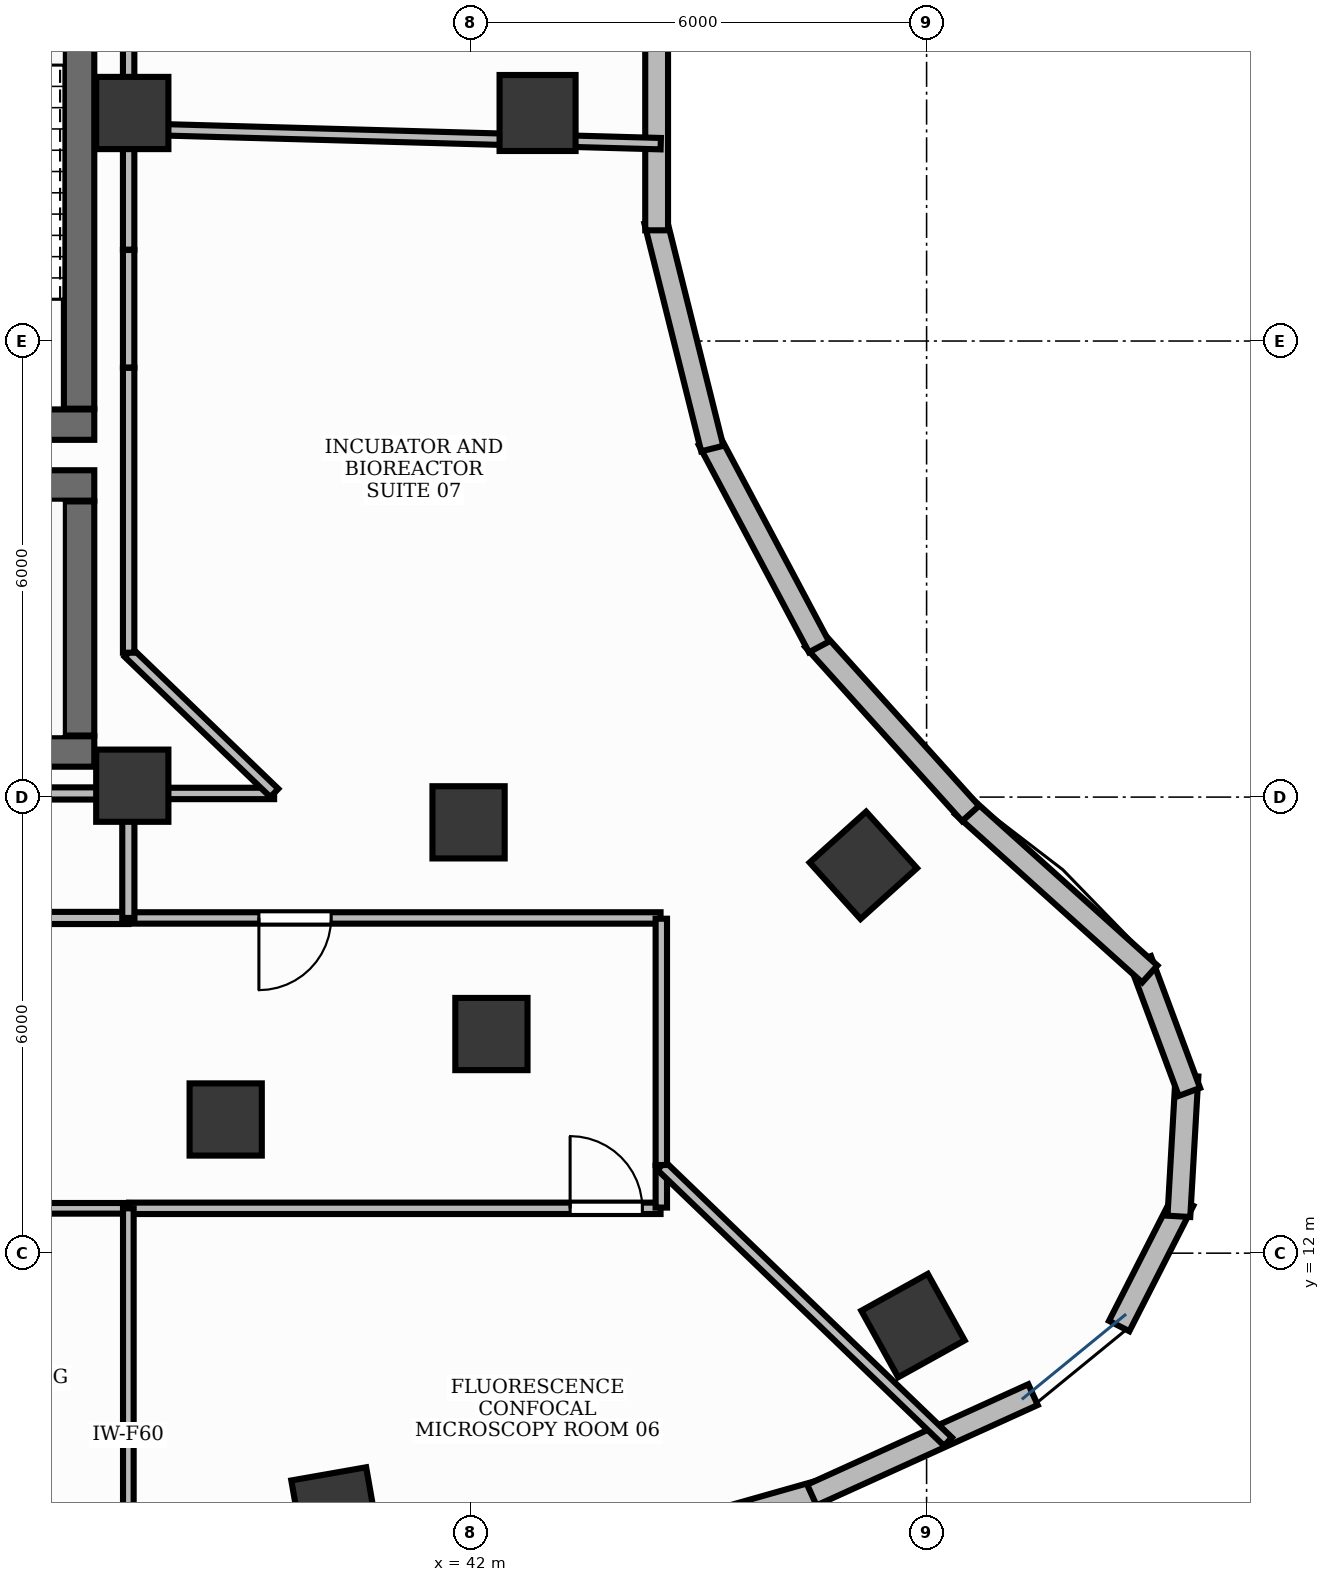
"""IFC4 building model, lengths in metres.
Left out: names, types, materials, properties, quantities, classifications, styles, units other than length and angle.
Written with IfcOpenShell. Run it as: python <this file> out.ifc"""

import sys

from ifc_helpers import new_model, si_unit, direction, frame, frame_2d, origin, origin_2d, place, context, subcontext, project, spatial, rectangle, extrude, element, fill, save


model = new_model("IFC4")
c1 = context("Model", 3, precision=1e-05, world=origin(), true_north=direction((0.0, 1.0)))
c2 = subcontext(c1, "Body", "Model", "MODEL_VIEW")
j1 = project(units=[si_unit("LENGTHUNIT", "METRE"), si_unit("PLANEANGLEUNIT", "RADIAN")], contexts=[c1])
p1 = place(None, origin())
s1 = spatial("IfcSite", under=j1, at=p1, CompositionType="ELEMENT")
p2 = place(p1, origin())
s2 = spatial("IfcBuilding", under=s1, at=p2, CompositionType="ELEMENT")
p3 = place(p2, frame((0.0, 0.0, 154.2)))
s3 = spatial("IfcBuildingStorey", under=s2, at=p3, CompositionType="ELEMENT", Elevation=154.2)
p4 = place(p3, frame((28.852, 18.6, 0.0), z_axis=(0.0, 0.0, 1.0), x_axis=(1.0, 0.0, 0.0)))
e1 = element("IfcWall", 1, at=p4, inside=s3, PredefinedType="SHEAR", context=c2, shape_type="SweptSolid", body=[
    extrude(rectangle(XDim=8.198, YDim=0.4, at=frame_2d((4.099, 0.0))), origin(), (0.0, 0.0, 1.0), 3.9),
])
p5 = place(p3, frame((28.4, 22.1, 0.0), z_axis=(0.0, 0.0, 1.0), x_axis=(1.0, 0.0, 0.0)))
e2 = element("IfcWall", 2, at=p5, inside=s3, PredefinedType="SHEAR", context=c2, shape_type="SweptSolid", body=[
    extrude(rectangle(XDim=8.65, YDim=0.4, at=frame_2d((4.325, 0.0))), origin(), (0.0, 0.0, 1.0), 3.9),
])
p6 = place(p3, frame((36.85, 18.81, 0.0), z_axis=(0.0, 0.0, 1.0), x_axis=(0.0, 1.0, 0.0)))
e3 = element("IfcWall", 3, at=p6, inside=s3, PredefinedType="SHEAR", context=c2, shape_type="SweptSolid", body=[
    extrude(rectangle(XDim=3.08, YDim=0.4, at=frame_2d((1.54, 0.0))), origin(), (0.0, 0.0, 1.0), 3.9),
])
p7 = place(p3, frame((33.15, 22.9, 0.0), z_axis=(0.0, 0.0, 1.0), x_axis=(1.0, 0.0, 0.0)))
e4 = element("IfcWall", 4, at=p7, inside=s3, PredefinedType="SHEAR", context=c2, shape_type="SweptSolid", body=[
    extrude(rectangle(XDim=3.9, YDim=0.4, at=frame_2d((1.95, 0.0))), origin(), (0.0, 0.0, 1.0), 3.9),
])
p8 = place(p3, frame((36.85, 23.11, 0.0), z_axis=(0.0, 0.0, 1.0), x_axis=(0.0, 1.0, 0.0)))
e5 = element("IfcWall", 5, at=p8, inside=s3, PredefinedType="SHEAR", context=c2, shape_type="SweptSolid", body=[
    extrude(rectangle(XDim=7.78, YDim=0.4, at=frame_2d((3.89, 0.0))), origin(), (0.0, 0.0, 1.0), 3.9),
])
for number, where, z_axis, x_axis in (
    (6, (37.55, 18.15, -0.0), (0.0, 0.0, 1.0), (1.0, 0.0, 0.0)),
    (7, (37.55, 27.0, -0.0), (0.0, 0.0, 1.0), (1.0, 0.0, 0.0)),
):
    element("IfcColumn", number, at=place(p3, frame(where, z_axis=z_axis, x_axis=x_axis)), inside=s3, PredefinedType="PILASTER", context=c2, shape_type="SweptSolid", body=[
        extrude(rectangle(XDim=0.95, YDim=0.95, at=origin_2d()), origin(), (0.0, 0.0, 1.0), 3.901),
    ])
p9 = place(p3, frame((40.221, 8.604, -0.0), z_axis=(0.0, 0.0, 1.0), x_axis=(0.984868307662, 0.173304404339, 0.0)))
e8 = element("IfcColumn", 8, at=p9, inside=s3, PredefinedType="COLUMN", context=c2, shape_type="SweptSolid", body=[
    extrude(rectangle(XDim=1.0, YDim=1.0, at=origin_2d()), origin(), (0.0, 0.0, 1.0), 3.901),
])
p10 = place(p3, frame((38.779, 13.759, -0.0), z_axis=(0.0, 0.0, 1.0), x_axis=(1.0, 0.0, 0.0)))
e9 = element("IfcColumn", 9, at=p10, inside=s3, PredefinedType="COLUMN", context=c2, shape_type="SweptSolid", body=[
    extrude(rectangle(XDim=0.95, YDim=0.95, at=origin_2d()), origin(), (0.0, 0.0, 1.0), 3.901),
])
p11 = place(p3, frame((47.821, 11.047, -0.0), z_axis=(0.0, 0.0, 1.0), x_axis=(0.874535078577, 0.484962262797, 0.0)))
e10 = element("IfcColumn", 10, at=p11, inside=s3, PredefinedType="COLUMN", context=c2, shape_type="SweptSolid", body=[
    extrude(rectangle(XDim=1.0, YDim=1.0, at=origin_2d()), origin(), (0.0, 0.0, 1.0), 3.901),
])
p12 = place(p3, frame((42.275, 14.883, -0.0), z_axis=(0.0, 0.0, 1.0), x_axis=(1.0, 0.0, 0.0)))
e11 = element("IfcColumn", 11, at=p12, inside=s3, PredefinedType="COLUMN", context=c2, shape_type="SweptSolid", body=[
    extrude(rectangle(XDim=0.95, YDim=0.95, at=origin_2d()), origin(), (0.0, 0.0, 1.0), 3.901),
])
p13 = place(p3, frame((47.167, 17.102, -0.0), z_axis=(0.0, 0.0, 1.0), x_axis=(-0.669130606359, 0.743144825477, 0.0)))
e12 = element("IfcColumn", 12, at=p13, inside=s3, PredefinedType="COLUMN", context=c2, shape_type="SweptSolid", body=[
    extrude(rectangle(XDim=1.0, YDim=1.0, at=origin_2d()), origin(), (0.0, 0.0, 1.0), 3.901),
])
p14 = place(p3, frame((41.974, 17.668, -0.0), z_axis=(0.0, 0.0, 1.0), x_axis=(1.0, 0.0, 0.0)))
e13 = element("IfcColumn", 13, at=p14, inside=s3, PredefinedType="COLUMN", context=c2, shape_type="SweptSolid", body=[
    extrude(rectangle(XDim=0.95, YDim=0.95, at=origin_2d()), origin(), (0.0, 0.0, 1.0), 3.901),
])
p15 = place(p3, frame((42.882, 27.0, -0.0), z_axis=(0.0, 0.0, 1.0), x_axis=(0.0, 1.0, 0.0)))
e14 = element("IfcColumn", 14, at=p15, inside=s3, PredefinedType="COLUMN", context=c2, shape_type="SweptSolid", body=[
    extrude(rectangle(XDim=1.0, YDim=1.0, at=origin_2d()), origin(), (0.0, 0.0, 1.0), 3.901),
])
p16 = place(p3, frame((40.493, 7.134, 0.0), z_axis=(0.0, 0.0, 1.0), x_axis=(0.962163849422, 0.272471515694, 0.0)))
e15 = element("IfcWall", 15, at=p16, inside=s3, PredefinedType="STANDARD", context=c2, shape_type="SweptSolid", body=[
    extrude(rectangle(XDim=6.409, YDim=0.3, at=frame_2d((3.205, 0.0))), origin(), (0.0, 0.0, 1.0), 3.9),
])
p17 = place(p3, frame((46.49, 8.818, 0.0), z_axis=(0.0, 0.0, 1.0), x_axis=(0.910633193525, 0.413215666268, 0.0)))
e16 = element("IfcWall", 16, at=p17, inside=s3, PredefinedType="STANDARD", context=c2, shape_type="SweptSolid", body=[
    extrude(rectangle(XDim=3.195, YDim=0.3, at=frame_2d((1.598, 0.0))), origin(), (0.0, 0.0, 1.0), 3.9),
])
for number, where, z_axis, x_axis in (
    (17, (50.534, 11.041, 0.0), (0.0, 0.0, 1.0), (0.454, 0.891, 0.0)),
    (18, (51.319, 12.484, 0.0), (0.0, 0.0, 1.0), (0.057, 0.998, 0.0)),
    (19, (51.458, 14.121, 0.0), (0.0, 0.0, 1.0), (-0.349, 0.937, 0.0)),
):
    element("IfcWall", number, at=place(p3, frame(where, z_axis=z_axis, x_axis=x_axis)), inside=s3, PredefinedType="STANDARD", context=c2, shape_type="SweptSolid", body=[
        extrude(rectangle(XDim=1.852, YDim=0.3, at=frame_2d((0.926, 0.0))), origin(), (0.0, 0.0, 1.0), 3.9),
    ])
p18 = place(p3, frame((50.936, 15.673, 0.0), z_axis=(0.0, 0.0, 1.0), x_axis=(-0.743341827472, 0.668911748687, 0.0)))
e20 = element("IfcWall", 20, at=p18, inside=s3, PredefinedType="STANDARD", context=c2, shape_type="SweptSolid", body=[
    extrude(rectangle(XDim=3.31, YDim=0.3, at=frame_2d((1.655, 0.0))), origin(), (0.0, 0.0, 1.0), 3.9),
])
for number, where, z_axis, x_axis in (
    (21, (48.579, 17.784, 0.0), (0.0, 0.0, 1.0), (-0.669, 0.743, 0.0)),
    (22, (46.584, 19.976, 0.0), (0.0, 0.0, 1.0), (-0.469, 0.883, 0.0)),
    (23, (45.18, 22.585, 0.0), (0.0, 0.0, 1.0), (-0.242, 0.97, 0.0)),
    (24, (44.448, 25.457, 0.0), (0.0, 0.0, 1.0), (0.0, 1.0, 0.0)),
):
    element("IfcWall", number, at=place(p3, frame(where, z_axis=z_axis, x_axis=x_axis)), inside=s3, PredefinedType="STANDARD", context=c2, shape_type="SweptSolid", body=[
        extrude(rectangle(XDim=3.087, YDim=0.3, at=frame_2d((1.543, 0.0))), origin(), (0.0, 0.0, 1.0), 3.9),
    ])
p19 = place(p3, frame((37.498, 16.41, 0.0), z_axis=(0.0, 0.0, 1.0), x_axis=(-1.0, 0.0, 0.0)))
e25 = element("IfcWall", 25, at=p19, inside=s3, PredefinedType="PARTITIONING", context=c2, shape_type="SweptSolid", body=[
    extrude(rectangle(XDim=8.498, YDim=0.16, at=frame_2d((4.249, 0.0))), origin(), (0.0, 0.0, 1.0), 2.91),
])
p20 = place(p19, frame((3.372, 0.0, 0.0)))
e26 = element("IfcOpeningElement", 26, at=p20, cuts=e25, PredefinedType="OPENING", context=c2, shape_type="SweptSolid", body=[
    extrude(rectangle(XDim=0.95, YDim=2.15, at=frame_2d((0.475, 1.075))), frame((0.0, 0.095, 0.0), z_axis=(0.0, -1.0, 0.0), x_axis=(1.0, 0.0, 0.0)), (0.0, 0.0, 1.0), 0.19),
])
p21 = place(p3, frame((32.695, 12.59, 0.0), z_axis=(0.0, 0.0, 1.0), x_axis=(1.0, 0.0, 0.0)))
e27 = element("IfcWall", 27, at=p21, inside=s3, PredefinedType="PARTITIONING", context=c2, shape_type="SweptSolid", body=[
    extrude(rectangle(XDim=4.803, YDim=0.14, at=frame_2d((2.401, 0.0))), origin(), (0.0, 0.0, 1.0), 2.91),
])
p22 = place(p21, frame((0.24, 0.0, 0.0)))
e28 = element("IfcOpeningElement", 28, at=p22, cuts=e27, PredefinedType="OPENING", context=c2, shape_type="SweptSolid", body=[
    extrude(rectangle(XDim=0.95, YDim=2.15, at=frame_2d((0.475, 1.075))), frame((0.0, 0.085, 0.0), z_axis=(0.0, -1.0, 0.0), x_axis=(1.0, 0.0, 0.0)), (0.0, 0.0, 1.0), 0.17),
])
p23 = place(p3, frame((37.508, 12.59, 0.0), z_axis=(0.0, 0.0, 1.0), x_axis=(1.0, 0.0, 0.0)))
e29 = element("IfcWall", 29, at=p23, inside=s3, PredefinedType="PARTITIONING", context=c2, shape_type="SweptSolid", body=[
    extrude(rectangle(XDim=6.992, YDim=0.15, at=frame_2d((3.496, 0.0))), origin(), (0.0, 0.0, 1.0), 2.91),
])
p24 = place(p23, frame((5.802, 0.0, 0.0)))
e30 = element("IfcOpeningElement", 30, at=p24, cuts=e29, PredefinedType="OPENING", context=c2, shape_type="SweptSolid", body=[
    extrude(rectangle(XDim=0.95, YDim=2.15, at=frame_2d((0.475, 1.075))), frame((0.0, 0.09, 0.0), z_axis=(0.0, -1.0, 0.0), x_axis=(1.0, 0.0, 0.0)), (0.0, 0.0, 1.0), 0.18),
])
p25 = place(p3, frame((44.5, 16.41, 0.0), z_axis=(0.0, 0.0, 1.0), x_axis=(-1.0, 0.0, 0.0)))
e31 = element("IfcWall", 31, at=p25, inside=s3, PredefinedType="PARTITIONING", context=c2, shape_type="SweptSolid", body=[
    extrude(rectangle(XDim=6.992, YDim=0.15, at=frame_2d((3.496, 0.0))), origin(), (0.0, 0.0, 1.0), 2.91),
])
p26 = place(p25, frame((4.334, 0.0, 0.0)))
e32 = element("IfcOpeningElement", 32, at=p26, cuts=e31, PredefinedType="OPENING", context=c2, shape_type="SweptSolid", body=[
    extrude(rectangle(XDim=0.95, YDim=2.15, at=frame_2d((0.475, 1.075))), frame((0.0, 0.09, 0.0), z_axis=(0.0, -1.0, 0.0), x_axis=(1.0, 0.0, 0.0)), (0.0, 0.0, 1.0), 0.18),
])
p27 = place(p3, frame((31.717, 18.048, 0.0), z_axis=(0.0, 0.0, 1.0), x_axis=(1.0, 0.0, 0.0)))
e33 = element("IfcWall", 33, at=p27, inside=s3, PredefinedType="PARTITIONING", context=c2, shape_type="SweptSolid", body=[
    extrude(rectangle(XDim=5.781, YDim=0.16, at=frame_2d((2.89, 0.0))), origin(), (0.0, 0.0, 1.0), 2.91),
])
p28 = place(p3, frame((37.498, 18.048, 0.0), z_axis=(0.0, 0.0, 1.0), x_axis=(0.0, -1.0, 0.0)))
e34 = element("IfcWall", 34, at=p28, inside=s3, PredefinedType="PARTITIONING", context=c2, shape_type="SweptSolid", body=[
    extrude(rectangle(XDim=1.638, YDim=0.16, at=frame_2d((0.819, 0.0))), origin(), (0.0, 0.0, 1.0), 2.91),
])
p29 = place(p3, frame((37.498, 12.59, 0.0), z_axis=(0.0, 0.0, 1.0), x_axis=(0.0, -1.0, 0.0)))
e35 = element("IfcWall", 35, at=p29, inside=s3, PredefinedType="PARTITIONING", context=c2, shape_type="SweptSolid", body=[
    extrude(rectangle(XDim=5.963, YDim=0.14, at=frame_2d((2.981, 0.0))), origin(), (0.0, 0.0, 1.0), 2.91),
])
p30 = place(p3, frame((44.51, 12.6, 0.0), z_axis=(0.0, 0.0, 1.0), x_axis=(0.0, 1.0, 0.0)))
e36 = element("IfcWall", 36, at=p30, inside=s3, PredefinedType="PARTITIONING", context=c2, shape_type="SweptSolid", body=[
    extrude(rectangle(XDim=0.55, YDim=0.15, at=frame_2d((0.275, 0.0))), origin(), (0.0, 0.0, 1.0), 2.91),
])
p31 = place(p3, frame((44.51, 13.15, 0.0), z_axis=(0.0, 0.0, 1.0), x_axis=(0.720549773239, -0.69340321912, 0.0)))
e37 = element("IfcWall", 37, at=p31, inside=s3, PredefinedType="PARTITIONING", context=c2, shape_type="SweptSolid", body=[
    extrude(rectangle(XDim=5.234, YDim=0.15, at=frame_2d((2.617, 0.0))), origin(), (0.0, 0.0, 1.0), 2.91),
])
p32 = place(p3, frame((37.502, 26.792, 0.0), z_axis=(0.0, 0.0, 1.0), x_axis=(0.999610026888, -0.027924794459, 0.0)))
e38 = element("IfcWall", 38, at=p32, inside=s3, PredefinedType="PARTITIONING", context=c2, shape_type="SweptSolid", body=[
    extrude(rectangle(XDim=7.003, YDim=0.15, at=frame_2d((3.501, 0.0))), origin(), (0.0, 0.0, 1.0), 2.91),
])
p33 = place(p3, frame((44.51, 13.16, 0.0), z_axis=(0.0, 0.0, 1.0), x_axis=(0.0, 1.0, 0.0)))
e39 = element("IfcWall", 39, at=p33, inside=s3, PredefinedType="PARTITIONING", context=c2, shape_type="SweptSolid", body=[
    extrude(rectangle(XDim=3.24, YDim=0.15, at=frame_2d((1.62, 0.0))), origin(), (0.0, 0.0, 1.0), 2.91),
])
p34 = place(p3, frame((37.508, 18.048, 0.0), z_axis=(0.0, 0.0, 1.0), x_axis=(1.0, 0.0, 0.0)))
e40 = element("IfcWall", 40, at=p34, inside=s3, PredefinedType="PARTITIONING", context=c2, shape_type="SweptSolid", body=[
    extrude(rectangle(XDim=1.908, YDim=0.15, at=frame_2d((0.954, 0.0))), origin(), (0.0, 0.0, 1.0), 2.91),
])
p35 = place(p3, frame((39.419, 18.055, 0.0), z_axis=(0.0, 0.0, 1.0), x_axis=(-0.720561375154, 0.693391162791, 0.0)))
e41 = element("IfcWall", 41, at=p35, inside=s3, PredefinedType="PARTITIONING", context=c2, shape_type="SweptSolid", body=[
    extrude(rectangle(XDim=2.66, YDim=0.15, at=frame_2d((1.33, 0.0))), origin(), (0.0, 0.0, 1.0), 2.91),
])
p36 = place(p3, frame((37.502, 19.899, 0.0), z_axis=(0.0, 0.0, 1.0), x_axis=(0.0, 1.0, 0.0)))
e42 = element("IfcWall", 42, at=p36, inside=s3, PredefinedType="PARTITIONING", context=c2, shape_type="SweptSolid", body=[
    extrude(rectangle(XDim=3.749, YDim=0.15, at=frame_2d((1.874, 0.0))), origin(), (0.0, 0.0, 1.0), 2.91),
])
p37 = place(p3, frame((37.502, 23.652, 0.0), z_axis=(0.0, 0.0, 1.0), x_axis=(0.0, 1.0, 0.0)))
e43 = element("IfcWall", 43, at=p37, inside=s3, PredefinedType="PARTITIONING", context=c2, shape_type="SweptSolid", body=[
    extrude(rectangle(XDim=1.546, YDim=0.15, at=frame_2d((0.773, 0.0))), origin(), (0.0, 0.0, 1.0), 2.91),
])
p38 = place(p3, frame((37.502, 25.202, 0.0), z_axis=(0.0, 0.0, 1.0), x_axis=(0.0, 1.0, 0.0)))
e44 = element("IfcWall", 44, at=p38, inside=s3, PredefinedType="PARTITIONING", context=c2, shape_type="SweptSolid", body=[
    extrude(rectangle(XDim=1.589, YDim=0.15, at=frame_2d((0.795, 0.0))), origin(), (0.0, 0.0, 1.0), 2.91),
])
p39 = place(p3, frame((37.502, 26.802, 0.0), z_axis=(0.0, 0.0, 1.0), x_axis=(0.0, 1.0, 0.0)))
e45 = element("IfcWall", 45, at=p39, inside=s3, PredefinedType="PARTITIONING", context=c2, shape_type="SweptSolid", body=[
    extrude(rectangle(XDim=8.107, YDim=0.15, at=frame_2d((4.053, 0.0))), origin(), (0.0, 0.0, 1.0), 2.91),
])
p40 = place(p24, origin())
e46 = element("IfcDoor", 46, at=p40, inside=s3, OperationType="SINGLE_SWING_LEFT", PredefinedType="DOOR", context=c2, shape_type="SweptSolid", body=[
    extrude(rectangle(XDim=0.95, YDim=2.15, at=frame_2d((0.475, 1.075))), frame((0.0, 0.025, 0.0), z_axis=(0.0, -1.0, 0.0), x_axis=(1.0, 0.0, 0.0)), (0.0, 0.0, 1.0), 0.05),
])
fill(e30, e46)
p41 = place(p26, origin())
e47 = element("IfcDoor", 47, at=p41, inside=s3, OperationType="SINGLE_SWING_RIGHT", PredefinedType="DOOR", context=c2, shape_type="SweptSolid", body=[
    extrude(rectangle(XDim=0.95, YDim=2.15, at=frame_2d((0.475, 1.075))), frame((0.0, 0.025, 0.0), z_axis=(0.0, -1.0, 0.0), x_axis=(1.0, 0.0, 0.0)), (0.0, 0.0, 1.0), 0.05),
])
fill(e32, e47)
save(model, sys.argv[1])
